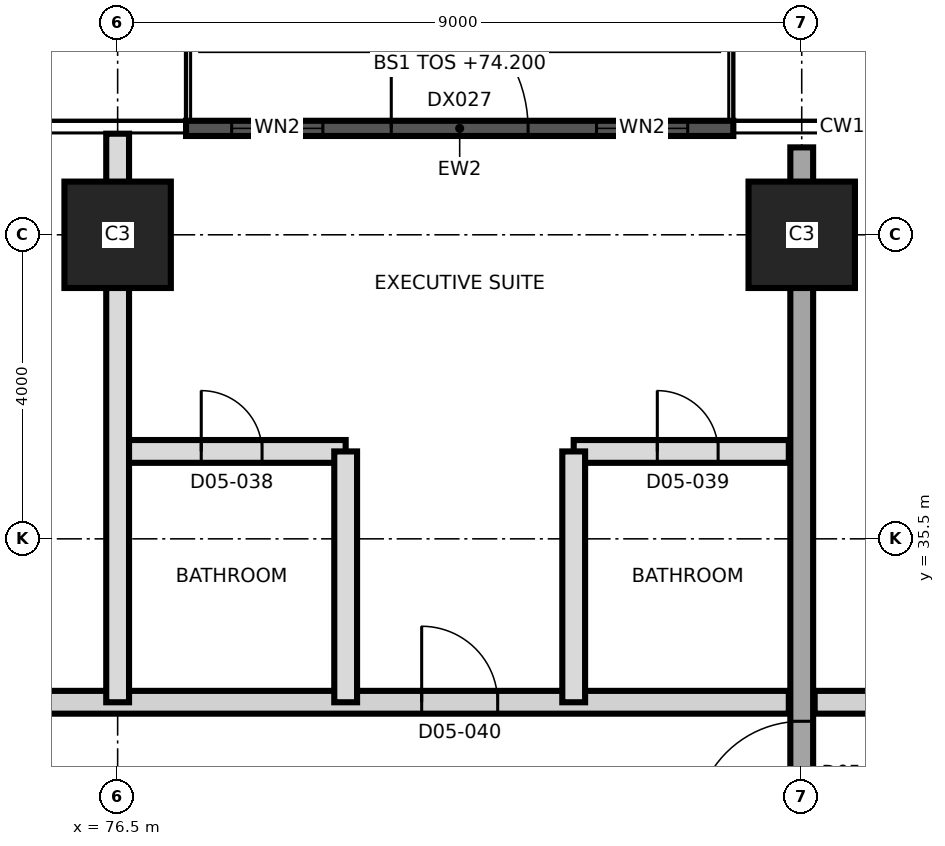
"""IFC4 building model, lengths in metres.
Left out: names, types, materials, properties, quantities, classifications, styles, units other than length and angle.
Written with IfcOpenShell. Run it as: python <this file> out.ifc"""

import sys

from ifc_helpers import new_model, si_unit, direction, frame, frame_2d, origin, origin_2d, place, context, subcontext, project, spatial, rectangle, extrude, element, fill, save


model = new_model("IFC4")
c1 = context("Model", 3, precision=1e-05, world=origin(), true_north=direction((0.0, 1.0)))
c2 = subcontext(c1, "Body", "Model", "MODEL_VIEW")
j1 = project(units=[si_unit("LENGTHUNIT", "METRE"), si_unit("PLANEANGLEUNIT", "RADIAN")], contexts=[c1])
p1 = place(None, origin())
s1 = spatial("IfcSite", under=j1, at=p1, CompositionType="ELEMENT")
p2 = place(p1, origin())
s2 = spatial("IfcBuilding", under=s1, at=p2, CompositionType="ELEMENT")
p3 = place(p2, frame((0.0, 0.0, 74.2)))
s3 = spatial("IfcBuildingStorey", under=s2, at=p3, CompositionType="ELEMENT", Elevation=74.2)
for number, where, z_axis, x_axis in (
    (1, (76.5, 39.5, 0.0), (0.0, 0.0, 1.0), (1.0, 0.0, 0.0)),
    (2, (85.5, 39.5, 0.0), (0.0, 0.0, 1.0), (1.0, 0.0, 0.0)),
):
    element("IfcColumn", number, at=place(p3, frame(where, z_axis=z_axis, x_axis=x_axis)), inside=s3, PredefinedType="COLUMN", context=c2, shape_type="SweptSolid", body=[
        extrude(rectangle(XDim=1.4, YDim=1.4, at=origin_2d()), origin(), (0.0, 0.0, 1.0), 3.7),
    ])
p4 = place(p3, frame((85.5, 20.35, 0.0), z_axis=(0.0, 0.0, 1.0), x_axis=(0.0, 1.0, 0.0)))
e3 = element("IfcWall", 3, at=p4, inside=s3, PredefinedType="SHEAR", context=c2, shape_type="SweptSolid", body=[
    extrude(rectangle(XDim=20.3, YDim=0.3, at=frame_2d((10.15, 0.0))), origin(), (0.0, 0.0, 1.0), 3.7),
])
p5 = place(p4, frame((11.35, 0.0, 0.0)))
e4 = element("IfcOpeningElement", 4, at=p5, cuts=e3, PredefinedType="OPENING", context=c2, shape_type="SweptSolid", body=[
    extrude(rectangle(XDim=1.4, YDim=2.1, at=frame_2d((0.7, 1.05))), frame((0.0, 0.16, 0.0), z_axis=(0.0, -1.0, 0.0), x_axis=(1.0, 0.0, 0.0)), (0.0, 0.0, 1.0), 0.32),
])
p6 = place(p3, frame((77.4, 40.9, 0.0), z_axis=(0.0, 0.0, 1.0), x_axis=(1.0, 0.0, 0.0)))
e5 = element("IfcWall", 5, at=p6, inside=s3, PredefinedType="SOLIDWALL", context=c2, shape_type="SweptSolid", body=[
    extrude(rectangle(XDim=7.2, YDim=0.2, at=frame_2d((3.6, 0.0))), origin(), (0.0, 0.0, 1.0), 3.4),
])
p7 = place(p6, frame((2.7, 0.0, 0.0)))
e6 = element("IfcOpeningElement", 6, at=p7, cuts=e5, PredefinedType="OPENING", context=c2, shape_type="SweptSolid", body=[
    extrude(rectangle(XDim=1.8, YDim=2.4, at=frame_2d((0.9, 1.2))), frame((0.0, 0.11, 0.0), z_axis=(0.0, -1.0, 0.0), x_axis=(1.0, 0.0, 0.0)), (0.0, 0.0, 1.0), 0.22),
])
p8 = place(p6, frame((5.4, 0.0, 0.9)))
e7 = element("IfcOpeningElement", 7, at=p8, cuts=e5, PredefinedType="OPENING", context=c2, shape_type="SweptSolid", body=[
    extrude(rectangle(XDim=1.2, YDim=2.1, at=frame_2d((0.6, 1.05))), frame((0.0, 0.11, 0.0), z_axis=(0.0, -1.0, 0.0), x_axis=(1.0, 0.0, 0.0)), (0.0, 0.0, 1.0), 0.22),
])
p9 = place(p6, frame((0.6, 0.0, 0.9)))
e8 = element("IfcOpeningElement", 8, at=p9, cuts=e5, PredefinedType="OPENING", context=c2, shape_type="SweptSolid", body=[
    extrude(rectangle(XDim=1.2, YDim=2.1, at=frame_2d((0.6, 1.05))), frame((0.0, 0.11, 0.0), z_axis=(0.0, -1.0, 0.0), x_axis=(1.0, 0.0, 0.0)), (0.0, 0.0, 1.0), 0.22),
])
p10 = place(p3, frame((58.95, 33.35, 0.0), z_axis=(0.0, 0.0, 1.0), x_axis=(1.0, 0.0, 0.0)))
e9 = element("IfcWall", 9, at=p10, inside=s3, PredefinedType="PARTITIONING", context=c2, shape_type="SweptSolid", body=[
    extrude(rectangle(XDim=26.38, YDim=0.3, at=frame_2d((13.19, 0.0))), origin(), (0.0, 0.0, 1.0), 3.4),
])
p11 = place(p10, frame((0.685, 0.0, 0.0)))
e10 = element("IfcOpeningElement", 10, at=p11, cuts=e9, PredefinedType="OPENING", context=c2, shape_type="SweptSolid", body=[
    extrude(rectangle(XDim=1.2, YDim=2.1, at=frame_2d((0.6, 1.05))), frame((0.0, 0.16, 0.0), z_axis=(0.0, -1.0, 0.0), x_axis=(1.0, 0.0, 0.0)), (0.0, 0.0, 1.0), 0.32),
])
p12 = place(p10, frame((3.935, 0.0, 0.0)))
e11 = element("IfcOpeningElement", 11, at=p12, cuts=e9, PredefinedType="OPENING", context=c2, shape_type="SweptSolid", body=[
    extrude(rectangle(XDim=1.0, YDim=2.1, at=frame_2d((0.5, 1.05))), frame((0.0, 0.16, 0.0), z_axis=(0.0, -1.0, 0.0), x_axis=(1.0, 0.0, 0.0)), (0.0, 0.0, 1.0), 0.32),
])
p13 = place(p10, frame((9.58, 0.0, 0.0)))
e12 = element("IfcOpeningElement", 12, at=p13, cuts=e9, PredefinedType="OPENING", context=c2, shape_type="SweptSolid", body=[
    extrude(rectangle(XDim=1.0, YDim=2.1, at=frame_2d((0.5, 1.05))), frame((0.0, 0.16, 0.0), z_axis=(0.0, -1.0, 0.0), x_axis=(1.0, 0.0, 0.0)), (0.0, 0.0, 1.0), 0.32),
])
p14 = place(p10, frame((15.43, 0.0, 0.0)))
e13 = element("IfcOpeningElement", 13, at=p14, cuts=e9, PredefinedType="OPENING", context=c2, shape_type="SweptSolid", body=[
    extrude(rectangle(XDim=1.0, YDim=2.1, at=frame_2d((0.5, 1.05))), frame((0.0, 0.16, 0.0), z_axis=(0.0, -1.0, 0.0), x_axis=(1.0, 0.0, 0.0)), (0.0, 0.0, 1.0), 0.32),
])
p15 = place(p10, frame((21.55, 0.0, 0.0)))
e14 = element("IfcOpeningElement", 14, at=p15, cuts=e9, PredefinedType="OPENING", context=c2, shape_type="SweptSolid", body=[
    extrude(rectangle(XDim=1.0, YDim=2.4, at=frame_2d((0.5, 1.2))), frame((0.0, 0.16, 0.0), z_axis=(0.0, -1.0, 0.0), x_axis=(1.0, 0.0, 0.0)), (0.0, 0.0, 1.0), 0.32),
])
p16 = place(p3, frame((85.67, 33.35, 0.0), z_axis=(0.0, 0.0, 1.0), x_axis=(1.0, 0.0, 0.0)))
e15 = element("IfcWall", 15, at=p16, inside=s3, PredefinedType="PARTITIONING", context=c2, shape_type="SweptSolid", body=[
    extrude(rectangle(XDim=9.58, YDim=0.3, at=frame_2d((4.79, 0.0))), origin(), (0.0, 0.0, 1.0), 3.4),
])
p17 = place(p16, frame((1.83, 0.0, 0.0)))
e16 = element("IfcOpeningElement", 16, at=p17, cuts=e15, PredefinedType="OPENING", context=c2, shape_type="SweptSolid", body=[
    extrude(rectangle(XDim=1.0, YDim=2.1, at=frame_2d((0.5, 1.05))), frame((0.0, 0.16, 0.0), z_axis=(0.0, -1.0, 0.0), x_axis=(1.0, 0.0, 0.0)), (0.0, 0.0, 1.0), 0.32),
])
p18 = place(p16, frame((5.63, 0.0, 0.0)))
e17 = element("IfcOpeningElement", 17, at=p18, cuts=e15, PredefinedType="OPENING", context=c2, shape_type="SweptSolid", body=[
    extrude(rectangle(XDim=1.0, YDim=2.1, at=frame_2d((0.5, 1.05))), frame((0.0, 0.16, 0.0), z_axis=(0.0, -1.0, 0.0), x_axis=(1.0, 0.0, 0.0)), (0.0, 0.0, 1.0), 0.32),
])
p19 = place(p3, frame((76.5, 36.65, 0.0), z_axis=(0.0, 0.0, 1.0), x_axis=(1.0, 0.0, 0.0)))
e18 = element("IfcWall", 18, at=p19, inside=s3, PredefinedType="PARTITIONING", context=c2, shape_type="SweptSolid", body=[
    extrude(rectangle(XDim=3.0, YDim=0.3, at=frame_2d((1.5, 0.0))), origin(), (0.0, 0.0, 1.0), 3.4),
])
p20 = place(p19, frame((1.1, 0.0, 0.0)))
e19 = element("IfcOpeningElement", 19, at=p20, cuts=e18, PredefinedType="OPENING", context=c2, shape_type="SweptSolid", body=[
    extrude(rectangle(XDim=0.8, YDim=2.1, at=frame_2d((0.4, 1.05))), frame((0.0, 0.16, 0.0), z_axis=(0.0, -1.0, 0.0), x_axis=(1.0, 0.0, 0.0)), (0.0, 0.0, 1.0), 0.32),
])
p21 = place(p3, frame((82.5, 36.65, 0.0), z_axis=(0.0, 0.0, 1.0), x_axis=(1.0, 0.0, 0.0)))
e20 = element("IfcWall", 20, at=p21, inside=s3, PredefinedType="PARTITIONING", context=c2, shape_type="SweptSolid", body=[
    extrude(rectangle(XDim=2.83, YDim=0.3, at=frame_2d((1.415, 0.0))), origin(), (0.0, 0.0, 1.0), 3.4),
])
p22 = place(p21, frame((1.1, 0.0, 0.0)))
e21 = element("IfcOpeningElement", 21, at=p22, cuts=e20, PredefinedType="OPENING", context=c2, shape_type="SweptSolid", body=[
    extrude(rectangle(XDim=0.8, YDim=2.1, at=frame_2d((0.4, 1.05))), frame((0.0, 0.16, 0.0), z_axis=(0.0, -1.0, 0.0), x_axis=(1.0, 0.0, 0.0)), (0.0, 0.0, 1.0), 0.32),
])
p23 = place(p3, frame((76.5, 33.35, 0.0), z_axis=(0.0, 0.0, 1.0), x_axis=(0.0, 1.0, 0.0)))
e22 = element("IfcWall", 22, at=p23, inside=s3, PredefinedType="PARTITIONING", context=c2, shape_type="SweptSolid", body=[
    extrude(rectangle(XDim=7.48, YDim=0.3, at=frame_2d((3.74, 0.0))), origin(), (0.0, 0.0, 1.0), 3.4),
])
for number, where, z_axis, x_axis in (
    (23, (79.5, 33.35, 0.0), (0.0, 0.0, 1.0), (0.0, 1.0, 0.0)),
    (24, (82.5, 33.35, 0.0), (0.0, 0.0, 1.0), (0.0, 1.0, 0.0)),
):
    element("IfcWall", number, at=place(p3, frame(where, z_axis=z_axis, x_axis=x_axis)), inside=s3, PredefinedType="PARTITIONING", context=c2, shape_type="SweptSolid", body=[
        extrude(rectangle(XDim=3.3, YDim=0.3, at=frame_2d((1.65, 0.0))), origin(), (0.0, 0.0, 1.0), 3.4),
    ])
p24 = place(p7, origin())
e25 = element("IfcDoor", 25, at=p24, inside=s3, OperationType="SINGLE_SWING_LEFT", PredefinedType="DOOR", context=c2, shape_type="SweptSolid", body=[
    extrude(rectangle(XDim=1.8, YDim=2.4, at=frame_2d((0.9, 1.2))), frame((0.0, 0.025, 0.0), z_axis=(0.0, -1.0, 0.0), x_axis=(1.0, 0.0, 0.0)), (0.0, 0.0, 1.0), 0.05),
])
fill(e6, e25)
p25 = place(p8, origin())
e26 = element("IfcWindow", 26, at=p25, inside=s3, PartitioningType="SINGLE_PANEL", PredefinedType="WINDOW", context=c2, shape_type="SweptSolid", body=[
    extrude(rectangle(XDim=1.2, YDim=2.1, at=frame_2d((0.6, 1.05))), frame((0.0, 0.03, 0.0), z_axis=(0.0, -1.0, 0.0), x_axis=(1.0, 0.0, 0.0)), (0.0, 0.0, 1.0), 0.06),
])
fill(e7, e26)
p26 = place(p9, origin())
e27 = element("IfcWindow", 27, at=p26, inside=s3, PartitioningType="SINGLE_PANEL", PredefinedType="WINDOW", context=c2, shape_type="SweptSolid", body=[
    extrude(rectangle(XDim=1.2, YDim=2.1, at=frame_2d((0.6, 1.05))), frame((0.0, 0.03, 0.0), z_axis=(0.0, -1.0, 0.0), x_axis=(1.0, 0.0, 0.0)), (0.0, 0.0, 1.0), 0.06),
])
fill(e8, e27)
p27 = place(p20, origin())
e28 = element("IfcDoor", 28, at=p27, inside=s3, OperationType="SINGLE_SWING_LEFT", PredefinedType="DOOR", context=c2, shape_type="SweptSolid", body=[
    extrude(rectangle(XDim=0.8, YDim=2.1, at=frame_2d((0.4, 1.05))), frame((0.0, 0.025, 0.0), z_axis=(0.0, -1.0, 0.0), x_axis=(1.0, 0.0, 0.0)), (0.0, 0.0, 1.0), 0.05),
])
fill(e19, e28)
p28 = place(p22, origin())
e29 = element("IfcDoor", 29, at=p28, inside=s3, OperationType="SINGLE_SWING_RIGHT", PredefinedType="DOOR", context=c2, shape_type="SweptSolid", body=[
    extrude(rectangle(XDim=0.8, YDim=2.1, at=frame_2d((0.4, 1.05))), frame((0.0, 0.025, 0.0), z_axis=(0.0, -1.0, 0.0), x_axis=(1.0, 0.0, 0.0)), (0.0, 0.0, 1.0), 0.05),
])
fill(e21, e29)
p29 = place(p15, origin())
e30 = element("IfcDoor", 30, at=p29, inside=s3, OperationType="SINGLE_SWING_LEFT", PredefinedType="DOOR", context=c2, shape_type="SweptSolid", body=[
    extrude(rectangle(XDim=1.0, YDim=2.4, at=frame_2d((0.5, 1.2))), frame((0.0, 0.025, 0.0), z_axis=(0.0, -1.0, 0.0), x_axis=(1.0, 0.0, 0.0)), (0.0, 0.0, 1.0), 0.05),
])
fill(e14, e30)
p30 = place(p5, origin())
e31 = element("IfcDoor", 31, at=p30, inside=s3, OperationType="SINGLE_SWING_RIGHT", PredefinedType="DOOR", context=c2, shape_type="SweptSolid", body=[
    extrude(rectangle(XDim=1.4, YDim=2.1, at=frame_2d((0.7, 1.05))), frame((0.0, 0.025, 0.0), z_axis=(0.0, -1.0, 0.0), x_axis=(1.0, 0.0, 0.0)), (0.0, 0.0, 1.0), 0.05),
])
fill(e4, e31)
save(model, sys.argv[1])
